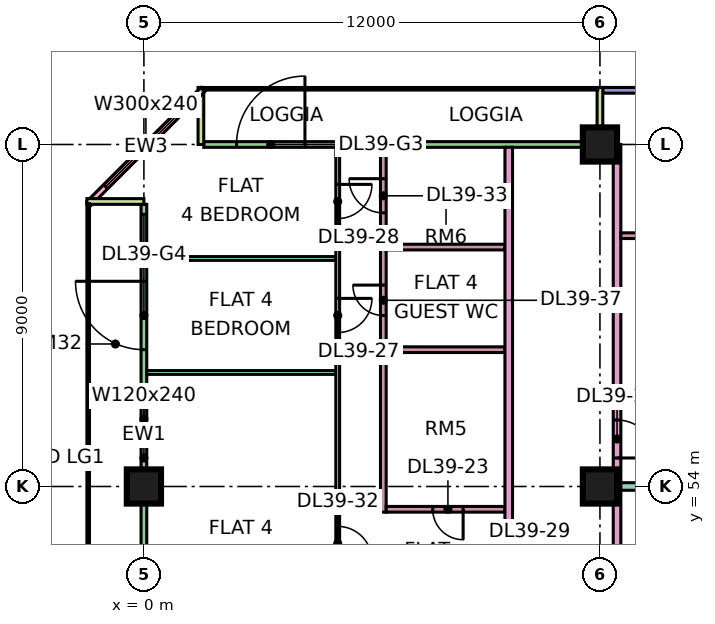
"""IFC4 building model, lengths in metres.
Left out: names, types, materials, properties, quantities, classifications, styles, units other than length and angle.
Written with IfcOpenShell. Run it as: python <this file> out.ifc"""

import sys

from ifc_helpers import new_model, si_unit, direction, frame, frame_2d, origin, origin_2d, place, context, subcontext, project, spatial, rectangle, extrude, element, fill, save


model = new_model("IFC4")
c1 = context("Model", 3, precision=1e-05, world=origin(), true_north=direction((0.0, 1.0)))
c2 = subcontext(c1, "Body", "Model", "MODEL_VIEW")
j1 = project(units=[si_unit("LENGTHUNIT", "METRE"), si_unit("PLANEANGLEUNIT", "RADIAN")], contexts=[c1])
p1 = place(None, origin())
s1 = spatial("IfcSite", under=j1, at=p1, CompositionType="ELEMENT")
p2 = place(p1, origin())
s2 = spatial("IfcBuilding", under=s1, at=p2, CompositionType="ELEMENT")
p3 = place(p2, frame((0.0, 0.0, 172.4)))
s3 = spatial("IfcBuildingStorey", under=s2, at=p3, CompositionType="ELEMENT", Elevation=172.4)
for number, where, z_axis, x_axis in (
    (1, (0.0, 54.0, 0.0), (0.0, 0.0, 1.0), (1.0, 0.0, 0.0)),
    (2, (12.0, 54.0, 0.0), (0.0, 0.0, 1.0), (1.0, 0.0, 0.0)),
    (3, (12.0, 63.0, 0.0), (0.0, 0.0, 1.0), (1.0, 0.0, 0.0)),
):
    element("IfcColumn", number, at=place(p3, frame(where, z_axis=z_axis, x_axis=x_axis)), inside=s3, PredefinedType="COLUMN", context=c2, shape_type="SweptSolid", body=[
        extrude(rectangle(XDim=0.9, YDim=0.9, at=origin_2d()), origin(), (0.0, 0.0, 1.0), 3.75),
    ])
p4 = place(p3, frame((22.5, 64.425, 0.0), z_axis=(0.0, 0.0, 1.0), x_axis=(-1.0, 0.0, 0.0)))
e4 = element("IfcWall", 4, at=p4, inside=s3, PredefinedType="SOLIDWALL", context=c2, shape_type="SweptSolid", body=[
    extrude(rectangle(XDim=10.425, YDim=0.15, at=frame_2d((5.212, 0.0))), origin(), (0.0, 0.0, 1.0), 3.35),
])
p5 = place(p4, frame((0.525, 0.0, 0.45)))
e5 = element("IfcOpeningElement", 5, at=p5, cuts=e4, PredefinedType="OPENING", context=c2, shape_type="SweptSolid", body=[
    extrude(rectangle(XDim=2.4, YDim=2.4, at=frame_2d((1.2, 1.2))), frame((0.0, 0.085, 0.0), z_axis=(0.0, -1.0, 0.0), x_axis=(1.0, 0.0, 0.0)), (0.0, 0.0, 1.0), 0.17),
])
p6 = place(p4, frame((5.85, 0.0, 0.45)))
e6 = element("IfcOpeningElement", 6, at=p6, cuts=e4, PredefinedType="OPENING", context=c2, shape_type="SweptSolid", body=[
    extrude(rectangle(XDim=3.0, YDim=2.4, at=frame_2d((1.5, 1.2))), frame((0.0, 0.085, 0.0), z_axis=(0.0, -1.0, 0.0), x_axis=(1.0, 0.0, 0.0)), (0.0, 0.0, 1.0), 0.17),
])
p7 = place(p3, frame((11.925, 63.0, 0.0), z_axis=(0.0, 0.0, 1.0), x_axis=(-1.0, 0.0, 0.0)))
e7 = element("IfcWall", 7, at=p7, inside=s3, PredefinedType="SOLIDWALL", context=c2, shape_type="SweptSolid", body=[
    extrude(rectangle(XDim=10.35, YDim=0.15, at=frame_2d((5.175, 0.0))), origin(), (0.0, 0.0, 1.0), 3.35),
])
p8 = place(p7, frame((7.688, 0.0, 0.0)))
e8 = element("IfcOpeningElement", 8, at=p8, cuts=e7, PredefinedType="OPENING", context=c2, shape_type="SweptSolid", body=[
    extrude(rectangle(XDim=1.8, YDim=2.4, at=frame_2d((0.9, 1.2))), frame((0.0, 0.085, 0.0), z_axis=(0.0, -1.0, 0.0), x_axis=(1.0, 0.0, 0.0)), (0.0, 0.0, 1.0), 0.17),
])
for number, where, z_axis, x_axis in (
    (9, (12.0, 64.5, 0.0), (0.0, 0.0, 1.0), (0.0, -1.0, 0.0)),
    (10, (1.5, 64.5, 0.0), (0.0, 0.0, 1.0), (0.0, -1.0, 0.0)),
):
    element("IfcWall", number, at=place(p3, frame(where, z_axis=z_axis, x_axis=x_axis)), inside=s3, PredefinedType="SOLIDWALL", context=c2, shape_type="SweptSolid", body=[
        extrude(rectangle(XDim=1.5, YDim=0.15, at=frame_2d((0.75, 0.0))), origin(), (0.0, 0.0, 1.0), 3.35),
    ])
p9 = place(p3, frame((1.553, 64.447, 0.0), z_axis=(0.0, 0.0, 1.0), x_axis=(-0.707106781187, -0.707106781187, 0.0)))
e11 = element("IfcWall", 11, at=p9, inside=s3, PredefinedType="SOLIDWALL", context=c2, shape_type="SweptSolid", body=[
    extrude(rectangle(XDim=4.243, YDim=0.15, at=frame_2d((2.121, 0.0))), origin(), (0.0, 0.0, 1.0), 3.35),
])
p10 = place(p9, frame((0.621, 0.0, 0.45)))
e12 = element("IfcOpeningElement", 12, at=p10, cuts=e11, PredefinedType="OPENING", context=c2, shape_type="SweptSolid", body=[
    extrude(rectangle(XDim=3.0, YDim=2.4, at=frame_2d((1.5, 1.2))), frame((0.0, 0.085, 0.0), z_axis=(0.0, -1.0, 0.0), x_axis=(1.0, 0.0, 0.0)), (0.0, 0.0, 1.0), 0.17),
])
p11 = place(p3, frame((0.0, 61.425, 0.0), z_axis=(0.0, 0.0, 1.0), x_axis=(0.0, -1.0, 0.0)))
e13 = element("IfcWall", 13, at=p11, inside=s3, PredefinedType="SOLIDWALL", context=c2, shape_type="SweptSolid", body=[
    extrude(rectangle(XDim=13.35, YDim=0.15, at=frame_2d((6.675, 0.0))), origin(), (0.0, 0.0, 1.0), 3.35),
])
p12 = place(p11, frame((0.262, 0.0, 0.45)))
e14 = element("IfcOpeningElement", 14, at=p12, cuts=e13, PredefinedType="OPENING", context=c2, shape_type="SweptSolid", body=[
    extrude(rectangle(XDim=0.9, YDim=2.4, at=frame_2d((0.45, 1.2))), frame((0.0, 0.085, 0.0), z_axis=(0.0, -1.0, 0.0), x_axis=(1.0, 0.0, 0.0)), (0.0, 0.0, 1.0), 0.17),
])
p13 = place(p11, frame((2.025, 0.0, 0.0)))
e15 = element("IfcOpeningElement", 15, at=p13, cuts=e13, PredefinedType="OPENING", context=c2, shape_type="SweptSolid", body=[
    extrude(rectangle(XDim=1.8, YDim=2.4, at=frame_2d((0.9, 1.2))), frame((0.0, 0.085, 0.0), z_axis=(0.0, -1.0, 0.0), x_axis=(1.0, 0.0, 0.0)), (0.0, 0.0, 1.0), 0.17),
])
p14 = place(p11, frame((5.05, 0.0, 0.45)))
e16 = element("IfcOpeningElement", 16, at=p14, cuts=e13, PredefinedType="OPENING", context=c2, shape_type="SweptSolid", body=[
    extrude(rectangle(XDim=1.2, YDim=2.4, at=frame_2d((0.6, 1.2))), frame((0.0, 0.085, 0.0), z_axis=(0.0, -1.0, 0.0), x_axis=(1.0, 0.0, 0.0)), (0.0, 0.0, 1.0), 0.17),
])
p15 = place(p11, frame((9.163, 0.0, 0.45)))
e17 = element("IfcOpeningElement", 17, at=p15, cuts=e13, PredefinedType="OPENING", context=c2, shape_type="SweptSolid", body=[
    extrude(rectangle(XDim=3.0, YDim=2.4, at=frame_2d((1.5, 1.2))), frame((0.0, 0.085, 0.0), z_axis=(0.0, -1.0, 0.0), x_axis=(1.0, 0.0, 0.0)), (0.0, 0.0, 1.0), 0.17),
])
p16 = place(p3, frame((-1.5, 61.5, 0.0), z_axis=(0.0, 0.0, 1.0), x_axis=(1.0, 0.0, 0.0)))
e18 = element("IfcWall", 18, at=p16, inside=s3, PredefinedType="SOLIDWALL", context=c2, shape_type="SweptSolid", body=[
    extrude(rectangle(XDim=1.5, YDim=0.15, at=frame_2d((0.75, 0.0))), origin(), (0.0, 0.0, 1.0), 3.35),
])
for number, where, z_axis, x_axis in (
    (19, (0.074, 57.0, 0.0), (0.0, 0.0, 1.0), (1.0, 0.0, 0.0)),
    (20, (0.074, 60.0, 0.0), (0.0, 0.0, 1.0), (1.0, 0.0, 0.0)),
):
    element("IfcWall", number, at=place(p3, frame(where, z_axis=z_axis, x_axis=x_axis)), inside=s3, PredefinedType="PARTITIONING", context=c2, shape_type="SweptSolid", body=[
        extrude(rectangle(XDim=4.976, YDim=0.1, at=frame_2d((2.488, 0.0))), origin(), (0.0, 0.0, 1.0), 3.35),
    ])
p17 = place(p3, frame((5.1, 36.1, 0.0), z_axis=(0.0, 0.0, 1.0), x_axis=(0.0, 1.0, 0.0)))
e21 = element("IfcWall", 21, at=p17, inside=s3, PredefinedType="PARTITIONING", context=c2, shape_type="SweptSolid", body=[
    extrude(rectangle(XDim=26.826, YDim=0.1, at=frame_2d((13.413, 0.0))), origin(), (0.0, 0.0, 1.0), 3.35),
])
p18 = place(p17, frame((0.95, 0.0, 0.0)))
e22 = element("IfcOpeningElement", 22, at=p18, cuts=e21, PredefinedType="OPENING", context=c2, shape_type="SweptSolid", body=[
    extrude(rectangle(XDim=0.9, YDim=2.1, at=frame_2d((0.45, 1.05))), frame((0.0, 0.06, 0.0), z_axis=(0.0, -1.0, 0.0), x_axis=(1.0, 0.0, 0.0)), (0.0, 0.0, 1.0), 0.12),
])
p19 = place(p17, frame((3.95, 0.0, 0.0)))
e23 = element("IfcOpeningElement", 23, at=p19, cuts=e21, PredefinedType="OPENING", context=c2, shape_type="SweptSolid", body=[
    extrude(rectangle(XDim=0.9, YDim=2.1, at=frame_2d((0.45, 1.05))), frame((0.0, 0.06, 0.0), z_axis=(0.0, -1.0, 0.0), x_axis=(1.0, 0.0, 0.0)), (0.0, 0.0, 1.0), 0.12),
])
p20 = place(p17, frame((9.95, 0.0, 0.0)))
e24 = element("IfcOpeningElement", 24, at=p20, cuts=e21, PredefinedType="OPENING", context=c2, shape_type="SweptSolid", body=[
    extrude(rectangle(XDim=0.9, YDim=2.1, at=frame_2d((0.45, 1.05))), frame((0.0, 0.06, 0.0), z_axis=(0.0, -1.0, 0.0), x_axis=(1.0, 0.0, 0.0)), (0.0, 0.0, 1.0), 0.12),
])
p21 = place(p17, frame((21.95, 0.0, 0.0)))
e25 = element("IfcOpeningElement", 25, at=p21, cuts=e21, PredefinedType="OPENING", context=c2, shape_type="SweptSolid", body=[
    extrude(rectangle(XDim=0.9, YDim=2.1, at=frame_2d((0.45, 1.05))), frame((0.0, 0.06, 0.0), z_axis=(0.0, -1.0, 0.0), x_axis=(1.0, 0.0, 0.0)), (0.0, 0.0, 1.0), 0.12),
])
p22 = place(p17, frame((24.95, 0.0, 0.0)))
e26 = element("IfcOpeningElement", 26, at=p22, cuts=e21, PredefinedType="OPENING", context=c2, shape_type="SweptSolid", body=[
    extrude(rectangle(XDim=0.9, YDim=2.1, at=frame_2d((0.45, 1.05))), frame((0.0, 0.06, 0.0), z_axis=(0.0, -1.0, 0.0), x_axis=(1.0, 0.0, 0.0)), (0.0, 0.0, 1.0), 0.12),
])
p23 = place(p17, frame((15.95, 0.0, 0.0)))
e27 = element("IfcOpeningElement", 27, at=p23, cuts=e21, PredefinedType="OPENING", context=c2, shape_type="SweptSolid", body=[
    extrude(rectangle(XDim=0.9, YDim=2.1, at=frame_2d((0.45, 1.05))), frame((0.0, 0.06, 0.0), z_axis=(0.0, -1.0, 0.0), x_axis=(1.0, 0.0, 0.0)), (0.0, 0.0, 1.0), 0.12),
])
p24 = place(p17, frame((6.95, 0.0, 0.0)))
e28 = element("IfcOpeningElement", 28, at=p24, cuts=e21, PredefinedType="OPENING", context=c2, shape_type="SweptSolid", body=[
    extrude(rectangle(XDim=0.9, YDim=2.1, at=frame_2d((0.45, 1.05))), frame((0.0, 0.06, 0.0), z_axis=(0.0, -1.0, 0.0), x_axis=(1.0, 0.0, 0.0)), (0.0, 0.0, 1.0), 0.12),
])
p25 = place(p3, frame((6.3, 53.325, 0.0), z_axis=(0.0, 0.0, 1.0), x_axis=(0.0, 1.0, 0.0)))
e29 = element("IfcWall", 29, at=p25, inside=s3, PredefinedType="PARTITIONING", context=c2, shape_type="SweptSolid", body=[
    extrude(rectangle(XDim=9.601, YDim=0.15, at=frame_2d((4.801, 0.0))), origin(), (0.0, 0.0, 1.0), 3.35),
])
p26 = place(p25, frame((7.875, 0.0, 0.0)))
e30 = element("IfcOpeningElement", 30, at=p26, cuts=e29, PredefinedType="OPENING", context=c2, shape_type="SweptSolid", body=[
    extrude(rectangle(XDim=0.9, YDim=2.1, at=frame_2d((0.45, 1.05))), frame((0.0, 0.085, 0.0), z_axis=(0.0, -1.0, 0.0), x_axis=(1.0, 0.0, 0.0)), (0.0, 0.0, 1.0), 0.17),
])
p27 = place(p25, frame((5.175, 0.0, 0.0)))
e31 = element("IfcOpeningElement", 31, at=p27, cuts=e29, PredefinedType="OPENING", context=c2, shape_type="SweptSolid", body=[
    extrude(rectangle(XDim=0.8, YDim=2.1, at=frame_2d((0.4, 1.05))), frame((0.0, 0.085, 0.0), z_axis=(0.0, -1.0, 0.0), x_axis=(1.0, 0.0, 0.0)), (0.0, 0.0, 1.0), 0.17),
])
p28 = place(p3, frame((6.375, 53.4, 0.0), z_axis=(0.0, 0.0, 1.0), x_axis=(1.0, 0.0, 0.0)))
e32 = element("IfcWall", 32, at=p28, inside=s3, PredefinedType="PARTITIONING", context=c2, shape_type="SweptSolid", body=[
    extrude(rectangle(XDim=3.125, YDim=0.15, at=frame_2d((1.562, 0.0))), origin(), (0.0, 0.0, 1.0), 3.35),
])
p29 = place(p28, frame((1.225, 0.0, 0.0)))
e33 = element("IfcOpeningElement", 33, at=p29, cuts=e32, PredefinedType="OPENING", context=c2, shape_type="SweptSolid", body=[
    extrude(rectangle(XDim=0.8, YDim=2.1, at=frame_2d((0.4, 1.05))), frame((0.0, 0.085, 0.0), z_axis=(0.0, -1.0, 0.0), x_axis=(1.0, 0.0, 0.0)), (0.0, 0.0, 1.0), 0.17),
])
for number, where, z_axis, x_axis in (
    (34, (6.375, 57.6, 0.0), (0.0, 0.0, 1.0), (1.0, 0.0, 0.0)),
    (35, (6.375, 60.3, 0.0), (0.0, 0.0, 1.0), (1.0, 0.0, 0.0)),
):
    element("IfcWall", number, at=place(p3, frame(where, z_axis=z_axis, x_axis=x_axis)), inside=s3, PredefinedType="PARTITIONING", context=c2, shape_type="SweptSolid", body=[
        extrude(rectangle(XDim=3.125, YDim=0.15, at=frame_2d((1.562, 0.0))), origin(), (0.0, 0.0, 1.0), 3.35),
    ])
p30 = place(p3, frame((9.6, 20.0, 0.0), z_axis=(0.0, 0.0, 1.0), x_axis=(0.0, 1.0, 0.0)))
e36 = element("IfcWall", 36, at=p30, inside=s3, PredefinedType="PARTITIONING", context=c2, shape_type="SweptSolid", body=[
    extrude(rectangle(XDim=42.926, YDim=0.2, at=frame_2d((21.463, 0.0))), origin(), (0.0, 0.0, 1.0), 3.35),
])
p31 = place(p30, frame((31.35, 0.0, 0.0)))
e37 = element("IfcOpeningElement", 37, at=p31, cuts=e36, PredefinedType="OPENING", context=c2, shape_type="SweptSolid", body=[
    extrude(rectangle(XDim=1.0, YDim=2.1, at=frame_2d((0.5, 1.05))), frame((0.0, 0.11, 0.0), z_axis=(0.0, -1.0, 0.0), x_axis=(1.0, 0.0, 0.0)), (0.0, 0.0, 1.0), 0.22),
])
p32 = place(p30, frame((0.6, 0.0, 0.0)))
e38 = element("IfcOpeningElement", 38, at=p32, cuts=e36, PredefinedType="OPENING", context=c2, shape_type="SweptSolid", body=[
    extrude(rectangle(XDim=1.2, YDim=2.1, at=frame_2d((0.6, 1.05))), frame((0.0, 0.11, 0.0), z_axis=(0.0, -1.0, 0.0), x_axis=(1.0, 0.0, 0.0)), (0.0, 0.0, 1.0), 0.22),
])
p33 = place(p30, frame((3.9, 0.0, 0.0)))
e39 = element("IfcOpeningElement", 39, at=p33, cuts=e36, PredefinedType="OPENING", context=c2, shape_type="SweptSolid", body=[
    extrude(rectangle(XDim=1.0, YDim=2.1, at=frame_2d((0.5, 1.05))), frame((0.0, 0.11, 0.0), z_axis=(0.0, -1.0, 0.0), x_axis=(1.0, 0.0, 0.0)), (0.0, 0.0, 1.0), 0.22),
])
p34 = place(p3, frame((12.45, 20.0, 0.0), z_axis=(0.0, 0.0, 1.0), x_axis=(0.0, 1.0, 0.0)))
e40 = element("IfcWall", 40, at=p34, inside=s3, PredefinedType="PARTITIONING", context=c2, shape_type="SweptSolid", body=[
    extrude(rectangle(XDim=43.0, YDim=0.2, at=frame_2d((21.5, 0.0))), origin(), (0.0, 0.0, 1.0), 3.35),
])
p35 = place(p34, frame((5.95, 0.0, 0.0)))
e41 = element("IfcOpeningElement", 41, at=p35, cuts=e40, PredefinedType="OPENING", context=c2, shape_type="SweptSolid", body=[
    extrude(rectangle(XDim=1.0, YDim=2.1, at=frame_2d((0.5, 1.05))), frame((0.0, 0.11, 0.0), z_axis=(0.0, -1.0, 0.0), x_axis=(1.0, 0.0, 0.0)), (0.0, 0.0, 1.0), 0.22),
])
p36 = place(p34, frame((12.0, 0.0, 0.0)))
e42 = element("IfcOpeningElement", 42, at=p36, cuts=e40, PredefinedType="OPENING", context=c2, shape_type="SweptSolid", body=[
    extrude(rectangle(XDim=1.0, YDim=2.1, at=frame_2d((0.5, 1.05))), frame((0.0, 0.11, 0.0), z_axis=(0.0, -1.0, 0.0), x_axis=(1.0, 0.0, 0.0)), (0.0, 0.0, 1.0), 0.22),
])
p37 = place(p34, frame((22.75, 0.0, 0.0)))
e43 = element("IfcOpeningElement", 43, at=p37, cuts=e40, PredefinedType="OPENING", context=c2, shape_type="SweptSolid", body=[
    extrude(rectangle(XDim=1.0, YDim=2.1, at=frame_2d((0.5, 1.05))), frame((0.0, 0.11, 0.0), z_axis=(0.0, -1.0, 0.0), x_axis=(1.0, 0.0, 0.0)), (0.0, 0.0, 1.0), 0.22),
])
p38 = place(p34, frame((34.75, 0.0, 0.0)))
e44 = element("IfcOpeningElement", 44, at=p38, cuts=e40, PredefinedType="OPENING", context=c2, shape_type="SweptSolid", body=[
    extrude(rectangle(XDim=1.0, YDim=2.1, at=frame_2d((0.5, 1.05))), frame((0.0, 0.11, 0.0), z_axis=(0.0, -1.0, 0.0), x_axis=(1.0, 0.0, 0.0)), (0.0, 0.0, 1.0), 0.22),
])
p39 = place(p34, frame((1.15, 0.0, 0.0)))
e45 = element("IfcOpeningElement", 45, at=p39, cuts=e40, PredefinedType="OPENING", context=c2, shape_type="SweptSolid", body=[
    extrude(rectangle(XDim=1.8, YDim=2.1, at=frame_2d((0.9, 1.05))), frame((0.0, 0.11, 0.0), z_axis=(0.0, -1.0, 0.0), x_axis=(1.0, 0.0, 0.0)), (0.0, 0.0, 1.0), 0.22),
])
p40 = place(p34, frame((28.6, 0.0, 0.0)))
e46 = element("IfcOpeningElement", 46, at=p40, cuts=e40, PredefinedType="OPENING", context=c2, shape_type="SweptSolid", body=[
    extrude(rectangle(XDim=1.8, YDim=2.1, at=frame_2d((0.9, 1.05))), frame((0.0, 0.11, 0.0), z_axis=(0.0, -1.0, 0.0), x_axis=(1.0, 0.0, 0.0)), (0.0, 0.0, 1.0), 0.22),
])
p41 = place(p3, frame((12.55, 54.0, 0.0), z_axis=(0.0, 0.0, 1.0), x_axis=(1.0, 0.0, 0.0)))
e47 = element("IfcWall", 47, at=p41, inside=s3, PredefinedType="PARTITIONING", context=c2, shape_type="SweptSolid", body=[
    extrude(rectangle(XDim=11.376, YDim=0.2, at=frame_2d((5.688, 0.0))), origin(), (0.0, 0.0, 1.0), 3.35),
])
for number, where, z_axis, x_axis in (
    (48, (12.55, 56.4, 0.0), (0.0, 0.0, 1.0), (1.0, 0.0, 0.0)),
    (49, (12.55, 60.6, 0.0), (0.0, 0.0, 1.0), (1.0, 0.0, 0.0)),
):
    element("IfcWall", number, at=place(p3, frame(where, z_axis=z_axis, x_axis=x_axis)), inside=s3, PredefinedType="PARTITIONING", context=c2, shape_type="SweptSolid", body=[
        extrude(rectangle(XDim=5.225, YDim=0.15, at=frame_2d((2.612, 0.0))), origin(), (0.0, 0.0, 1.0), 3.35),
    ])
p42 = place(p8, frame((1.8, 0.0, 0.0), z_axis=(0.0, 0.0, 1.0), x_axis=(-1.0, 0.0, 0.0)))
e50 = element("IfcDoor", 50, at=p42, inside=s3, OperationType="DOUBLE_DOOR_SINGLE_SWING", PredefinedType="DOOR", context=c2, shape_type="SweptSolid", body=[
    extrude(rectangle(XDim=1.8, YDim=2.4, at=frame_2d((0.9, 1.2))), frame((0.0, 0.025, 0.0), z_axis=(0.0, -1.0, 0.0), x_axis=(1.0, 0.0, 0.0)), (0.0, 0.0, 1.0), 0.05),
])
fill(e8, e50)
p43 = place(p10, origin())
e51 = element("IfcWindow", 51, at=p43, inside=s3, PartitioningType="SINGLE_PANEL", PredefinedType="WINDOW", context=c2, shape_type="SweptSolid", body=[
    extrude(rectangle(XDim=3.0, YDim=2.4, at=frame_2d((1.5, 1.2))), frame((0.0, 0.03, 0.0), z_axis=(0.0, -1.0, 0.0), x_axis=(1.0, 0.0, 0.0)), (0.0, 0.0, 1.0), 0.06),
])
fill(e12, e51)
p44 = place(p12, origin())
e52 = element("IfcWindow", 52, at=p44, inside=s3, PartitioningType="SINGLE_PANEL", PredefinedType="WINDOW", context=c2, shape_type="SweptSolid", body=[
    extrude(rectangle(XDim=0.9, YDim=2.4, at=frame_2d((0.45, 1.2))), frame((0.0, 0.03, 0.0), z_axis=(0.0, -1.0, 0.0), x_axis=(1.0, 0.0, 0.0)), (0.0, 0.0, 1.0), 0.06),
])
fill(e14, e52)
p45 = place(p13, frame((1.8, 0.0, 0.0), z_axis=(0.0, 0.0, 1.0), x_axis=(-1.0, 0.0, 0.0)))
e53 = element("IfcDoor", 53, at=p45, inside=s3, OperationType="DOUBLE_DOOR_SINGLE_SWING", PredefinedType="DOOR", context=c2, shape_type="SweptSolid", body=[
    extrude(rectangle(XDim=1.8, YDim=2.4, at=frame_2d((0.9, 1.2))), frame((0.0, 0.025, 0.0), z_axis=(0.0, -1.0, 0.0), x_axis=(1.0, 0.0, 0.0)), (0.0, 0.0, 1.0), 0.05),
])
fill(e15, e53)
p46 = place(p14, origin())
e54 = element("IfcWindow", 54, at=p46, inside=s3, PartitioningType="SINGLE_PANEL", PredefinedType="WINDOW", context=c2, shape_type="SweptSolid", body=[
    extrude(rectangle(XDim=1.2, YDim=2.4, at=frame_2d((0.6, 1.2))), frame((0.0, 0.03, 0.0), z_axis=(0.0, -1.0, 0.0), x_axis=(1.0, 0.0, 0.0)), (0.0, 0.0, 1.0), 0.06),
])
fill(e16, e54)
p47 = place(p38, frame((1.0, 0.0, 0.0), z_axis=(0.0, 0.0, 1.0), x_axis=(-1.0, 0.0, 0.0)))
e55 = element("IfcDoor", 55, at=p47, inside=s3, OperationType="SINGLE_SWING_LEFT", PredefinedType="DOOR", context=c2, shape_type="SweptSolid", body=[
    extrude(rectangle(XDim=1.0, YDim=2.1, at=frame_2d((0.5, 1.05))), frame((0.0, 0.025, 0.0), z_axis=(0.0, -1.0, 0.0), x_axis=(1.0, 0.0, 0.0)), (0.0, 0.0, 1.0), 0.05),
])
fill(e44, e55)
p48 = place(p29, origin())
e56 = element("IfcDoor", 56, at=p48, inside=s3, OperationType="SINGLE_SWING_RIGHT", PredefinedType="DOOR", context=c2, shape_type="SweptSolid", body=[
    extrude(rectangle(XDim=0.8, YDim=2.1, at=frame_2d((0.4, 1.05))), frame((0.0, 0.025, 0.0), z_axis=(0.0, -1.0, 0.0), x_axis=(1.0, 0.0, 0.0)), (0.0, 0.0, 1.0), 0.05),
])
fill(e33, e56)
p49 = place(p21, origin())
e57 = element("IfcDoor", 57, at=p49, inside=s3, OperationType="SINGLE_SWING_RIGHT", PredefinedType="DOOR", context=c2, shape_type="SweptSolid", body=[
    extrude(rectangle(XDim=0.9, YDim=2.1, at=frame_2d((0.45, 1.05))), frame((0.0, 0.025, 0.0), z_axis=(0.0, -1.0, 0.0), x_axis=(1.0, 0.0, 0.0)), (0.0, 0.0, 1.0), 0.05),
])
fill(e25, e57)
p50 = place(p22, origin())
e58 = element("IfcDoor", 58, at=p50, inside=s3, OperationType="SINGLE_SWING_RIGHT", PredefinedType="DOOR", context=c2, shape_type="SweptSolid", body=[
    extrude(rectangle(XDim=0.9, YDim=2.1, at=frame_2d((0.45, 1.05))), frame((0.0, 0.025, 0.0), z_axis=(0.0, -1.0, 0.0), x_axis=(1.0, 0.0, 0.0)), (0.0, 0.0, 1.0), 0.05),
])
fill(e26, e58)
p51 = place(p23, frame((0.9, 0.0, 0.0), z_axis=(0.0, 0.0, 1.0), x_axis=(-1.0, 0.0, 0.0)))
e59 = element("IfcDoor", 59, at=p51, inside=s3, OperationType="SINGLE_SWING_LEFT", PredefinedType="DOOR", context=c2, shape_type="SweptSolid", body=[
    extrude(rectangle(XDim=0.9, YDim=2.1, at=frame_2d((0.45, 1.05))), frame((0.0, 0.025, 0.0), z_axis=(0.0, -1.0, 0.0), x_axis=(1.0, 0.0, 0.0)), (0.0, 0.0, 1.0), 0.05),
])
fill(e27, e59)
p52 = place(p26, frame((0.9, 0.0, 0.0), z_axis=(0.0, 0.0, 1.0), x_axis=(-1.0, 0.0, 0.0)))
e60 = element("IfcDoor", 60, at=p52, inside=s3, OperationType="SINGLE_SWING_RIGHT", PredefinedType="DOOR", context=c2, shape_type="SweptSolid", body=[
    extrude(rectangle(XDim=0.9, YDim=2.1, at=frame_2d((0.45, 1.05))), frame((0.0, 0.025, 0.0), z_axis=(0.0, -1.0, 0.0), x_axis=(1.0, 0.0, 0.0)), (0.0, 0.0, 1.0), 0.05),
])
fill(e30, e60)
p53 = place(p27, frame((0.8, 0.0, 0.0), z_axis=(0.0, 0.0, 1.0), x_axis=(-1.0, 0.0, 0.0)))
e61 = element("IfcDoor", 61, at=p53, inside=s3, OperationType="SINGLE_SWING_RIGHT", PredefinedType="DOOR", context=c2, shape_type="SweptSolid", body=[
    extrude(rectangle(XDim=0.8, YDim=2.1, at=frame_2d((0.4, 1.05))), frame((0.0, 0.025, 0.0), z_axis=(0.0, -1.0, 0.0), x_axis=(1.0, 0.0, 0.0)), (0.0, 0.0, 1.0), 0.05),
])
fill(e31, e61)
save(model, sys.argv[1])
